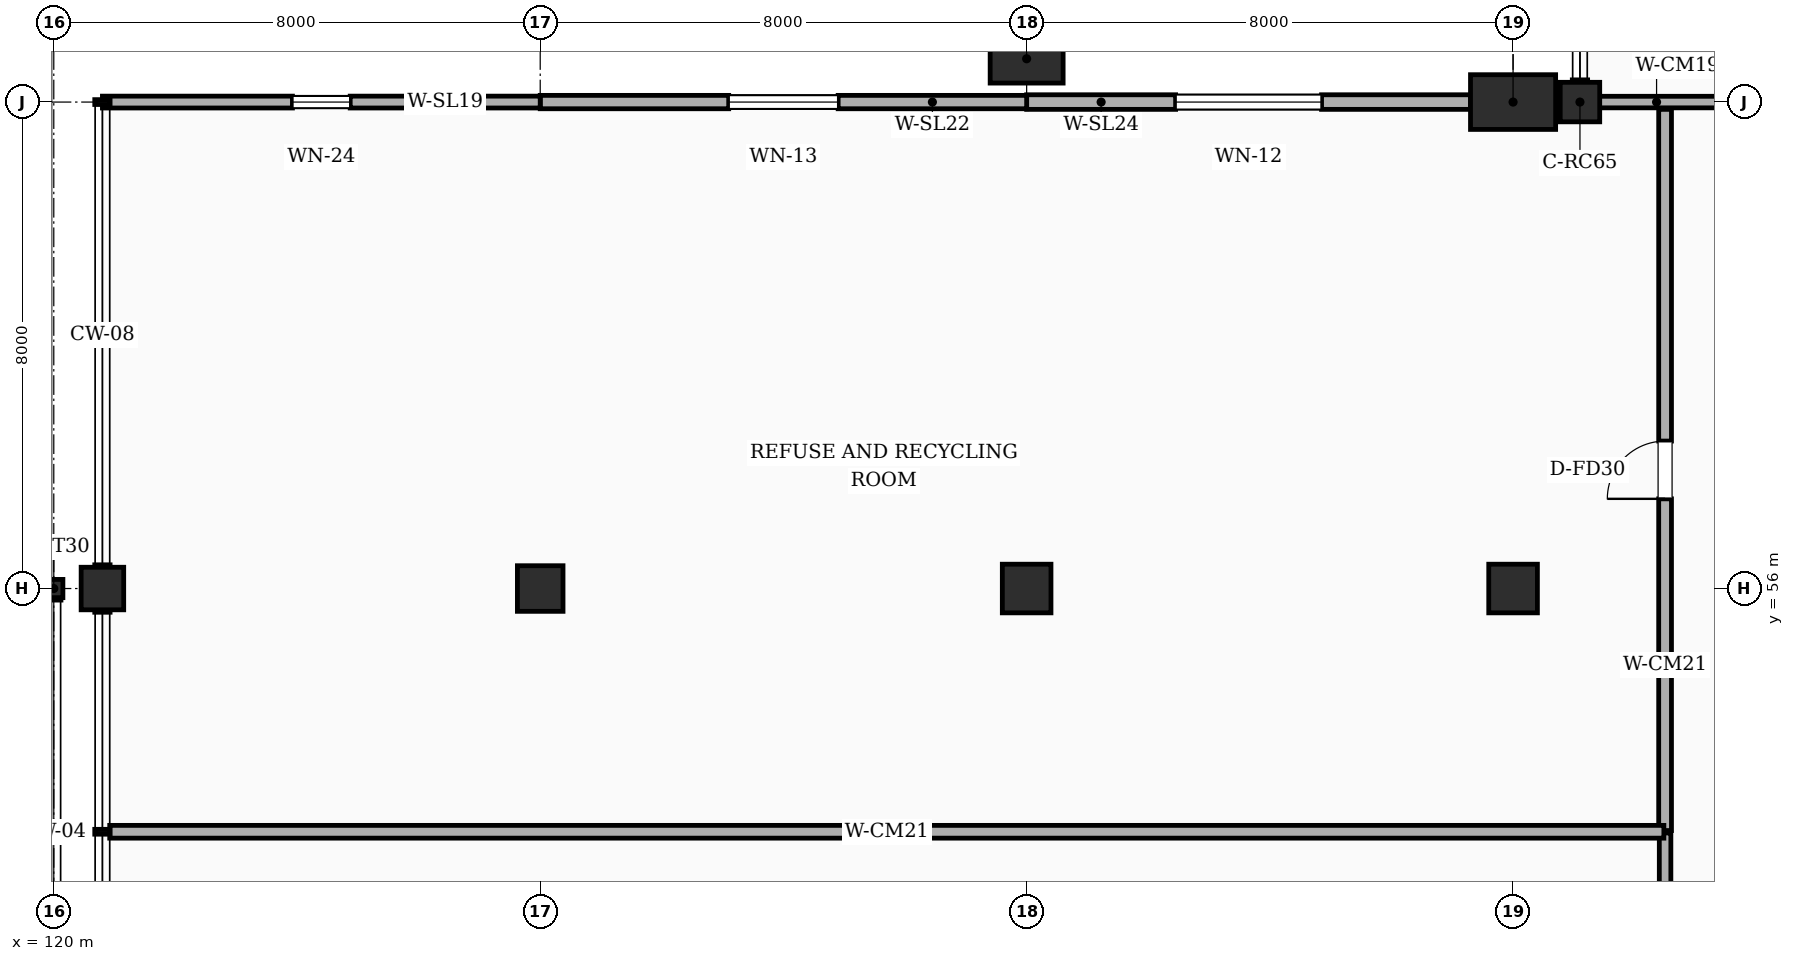
"""IFC4 building model, lengths in metres.
Left out: names, types, materials, properties, quantities, classifications, styles, units other than length and angle.
Written with IfcOpenShell. Run it as: python <this file> out.ifc"""

import sys

from ifc_helpers import new_model, si_unit, direction, frame, frame_2d, origin, origin_2d, place, context, subcontext, project, spatial, rectangle, i_section, extrude, element, fill, save


model = new_model("IFC4")
c1 = context("Model", 3, precision=1e-05, world=origin(), true_north=direction((0.0, 1.0)))
c2 = subcontext(c1, "Body", "Model", "MODEL_VIEW")
j1 = project(units=[si_unit("LENGTHUNIT", "METRE"), si_unit("PLANEANGLEUNIT", "RADIAN")], contexts=[c1])
p1 = place(None, origin())
s1 = spatial("IfcSite", under=j1, at=p1, CompositionType="ELEMENT")
p2 = place(p1, origin())
s2 = spatial("IfcBuilding", under=s1, at=p2, CompositionType="ELEMENT")
p3 = place(p2, origin())
s3 = spatial("IfcBuildingStorey", under=s2, at=p3, CompositionType="ELEMENT", Elevation=0.0)
p4 = place(p3, frame((136.0, 64.712, 0.0), z_axis=(0.0, 0.0, 1.0), x_axis=(1.0, 0.0, 0.0)))
e1 = element("IfcColumn", 1, at=p4, inside=s3, PredefinedType="COLUMN", context=c2, shape_type="SweptSolid", body=[
    extrude(rectangle(XDim=1.2, YDim=0.8, at=origin_2d()), origin(), (0.0, 0.0, 1.0), 5.4),
])
p5 = place(p3, frame((144.0, 64.0, 0.0), z_axis=(0.0, 0.0, 1.0), x_axis=(1.0, 0.0, 0.0)))
e2 = element("IfcColumn", 2, at=p5, inside=s3, PredefinedType="COLUMN", context=c2, shape_type="SweptSolid", body=[
    extrude(rectangle(XDim=1.4, YDim=0.9, at=origin_2d()), origin(), (0.0, 0.0, 1.0), 5.4),
])
p6 = place(p3, frame((120.0, 56.0, 0.0), z_axis=(0.0, 0.0, 1.0), x_axis=(1.0, 0.0, 0.0)))
e3 = element("IfcColumn", 3, at=p6, inside=s3, PredefinedType="COLUMN", context=c2, shape_type="SweptSolid", body=[
    extrude(i_section(OverallWidth=0.3, OverallDepth=0.3, WebThickness=0.011, FlangeThickness=0.019, FilletRadius=0.027, at=origin_2d()), origin(), (0.0, 0.0, 1.0), 5.4),
])
p7 = place(p3, frame((120.8, 56.0, 0.0), z_axis=(0.0, 0.0, 1.0), x_axis=(1.0, 0.0, 0.0)))
e4 = element("IfcColumn", 4, at=p7, inside=s3, PredefinedType="COLUMN", context=c2, shape_type="SweptSolid", body=[
    extrude(rectangle(XDim=0.7, YDim=0.7, at=origin_2d()), origin(), (0.0, 0.0, 1.0), 5.4),
])
p8 = place(p3, frame((128.0, 56.0, 0.0), z_axis=(0.0, 0.0, 1.0), x_axis=(1.0, 0.0, 0.0)))
e5 = element("IfcColumn", 5, at=p8, inside=s3, PredefinedType="COLUMN", context=c2, shape_type="SweptSolid", body=[
    extrude(rectangle(XDim=0.75, YDim=0.75, at=origin_2d()), origin(), (0.0, 0.0, 1.0), 5.4),
])
for number, where, z_axis, x_axis in (
    (6, (136.0, 56.0, 0.0), (0.0, 0.0, 1.0), (1.0, 0.0, 0.0)),
    (7, (144.0, 56.0, 0.0), (0.0, 0.0, 1.0), (1.0, 0.0, 0.0)),
):
    element("IfcColumn", number, at=place(p3, frame(where, z_axis=z_axis, x_axis=x_axis)), inside=s3, PredefinedType="COLUMN", context=c2, shape_type="SweptSolid", body=[
        extrude(rectangle(XDim=0.8, YDim=0.8, at=origin_2d()), origin(), (0.0, 0.0, 1.0), 5.4),
    ])
p9 = place(p3, frame((145.1, 64.0, 0.0), z_axis=(0.0, 0.0, 1.0), x_axis=(1.0, 0.0, 0.0)))
e8 = element("IfcColumn", 8, at=p9, inside=s3, PredefinedType="COLUMN", context=c2, shape_type="SweptSolid", body=[
    extrude(rectangle(XDim=0.65, YDim=0.65, at=origin_2d()), origin(), (0.0, 0.0, 1.0), 5.4),
])
p10 = place(p3, frame((143.3, 64.0, 0.0), z_axis=(0.0, 0.0, 1.0), x_axis=(-1.0, 0.0, 0.0)))
e9 = element("IfcWall", 9, at=p10, inside=s3, PredefinedType="SOLIDWALL", context=c2, shape_type="SweptSolid", body=[
    extrude(rectangle(XDim=7.3, YDim=0.24, at=frame_2d((3.65, 0.0))), origin(), (0.0, 0.0, 1.0), 5.1),
])
p11 = place(p10, frame((2.45, 0.0, 0.95)))
e10 = element("IfcOpeningElement", 10, at=p11, cuts=e9, PredefinedType="OPENING", context=c2, shape_type="SweptSolid", body=[
    extrude(rectangle(XDim=2.4, YDim=1.85, at=frame_2d((1.2, 0.925))), frame((0.0, 0.13, 0.0), z_axis=(0.0, -1.0, 0.0), x_axis=(1.0, 0.0, 0.0)), (0.0, 0.0, 1.0), 0.26),
])
p12 = place(p3, frame((136.0, 64.0, 0.0), z_axis=(0.0, 0.0, 1.0), x_axis=(-1.0, 0.0, 0.0)))
e11 = element("IfcWall", 11, at=p12, inside=s3, PredefinedType="SOLIDWALL", context=c2, shape_type="SweptSolid", body=[
    extrude(rectangle(XDim=8.0, YDim=0.22, at=frame_2d((4.0, 0.0))), origin(), (0.0, 0.0, 1.0), 5.1),
])
p13 = place(p12, frame((3.1, 0.0, 0.95)))
e12 = element("IfcOpeningElement", 12, at=p13, cuts=e11, PredefinedType="OPENING", context=c2, shape_type="SweptSolid", body=[
    extrude(rectangle(XDim=1.8, YDim=1.85, at=frame_2d((0.9, 0.925))), frame((0.0, 0.12, 0.0), z_axis=(0.0, -1.0, 0.0), x_axis=(1.0, 0.0, 0.0)), (0.0, 0.0, 1.0), 0.24),
])
p14 = place(p3, frame((128.0, 64.0, 0.0), z_axis=(0.0, 0.0, 1.0), x_axis=(-1.0, 0.0, 0.0)))
e13 = element("IfcWall", 13, at=p14, inside=s3, PredefinedType="SOLIDWALL", context=c2, shape_type="SweptSolid", body=[
    extrude(rectangle(XDim=7.2, YDim=0.195, at=frame_2d((3.6, 0.0))), origin(), (0.0, 0.0, 1.0), 5.1),
])
p15 = place(p14, frame((3.125, 0.0, 0.95)))
e14 = element("IfcOpeningElement", 14, at=p15, cuts=e13, PredefinedType="OPENING", context=c2, shape_type="SweptSolid", body=[
    extrude(rectangle(XDim=0.95, YDim=2.1, at=frame_2d((0.475, 1.05))), frame((0.0, 0.107, 0.0), z_axis=(0.0, -1.0, 0.0), x_axis=(1.0, 0.0, 0.0)), (0.0, 0.0, 1.0), 0.215),
])
p16 = place(p3, frame((146.5, 36.02, 0.0), z_axis=(0.0, 0.0, 1.0), x_axis=(0.0, 1.0, 0.0)))
e15 = element("IfcWall", 15, at=p16, inside=s3, PredefinedType="SOLIDWALL", context=c2, shape_type="SweptSolid", body=[
    extrude(rectangle(XDim=15.96, YDim=0.19, at=frame_2d((7.98, 0.0))), origin(), (0.0, 0.0, 1.0), 5.1),
])
p17 = place(p16, frame((7.38, 0.0, 0.0)))
e16 = element("IfcOpeningElement", 16, at=p17, cuts=e15, PredefinedType="OPENING", context=c2, shape_type="SweptSolid", body=[
    extrude(rectangle(XDim=1.2, YDim=2.15, at=frame_2d((0.6, 1.075))), frame((0.0, 0.105, 0.0), z_axis=(0.0, -1.0, 0.0), x_axis=(1.0, 0.0, 0.0)), (0.0, 0.0, 1.0), 0.21),
])
p18 = place(p3, frame((146.5, 52.02, 0.0), z_axis=(0.0, 0.0, 1.0), x_axis=(0.0, 1.0, 0.0)))
e17 = element("IfcWall", 17, at=p18, inside=s3, PredefinedType="SOLIDWALL", context=c2, shape_type="SweptSolid", body=[
    extrude(rectangle(XDim=11.86, YDim=0.21, at=frame_2d((5.93, 0.0))), origin(), (0.0, 0.0, 1.0), 4.27),
])
p19 = place(p18, frame((5.455, 0.0, 0.0)))
e18 = element("IfcOpeningElement", 18, at=p19, cuts=e17, PredefinedType="OPENING", context=c2, shape_type="SweptSolid", body=[
    extrude(rectangle(XDim=0.95, YDim=2.1, at=frame_2d((0.475, 1.05))), frame((0.0, 0.115, 0.0), z_axis=(0.0, -1.0, 0.0), x_axis=(1.0, 0.0, 0.0)), (0.0, 0.0, 1.0), 0.23),
])
p20 = place(p3, frame((120.92, 52.0, 0.0), z_axis=(0.0, 0.0, 1.0), x_axis=(1.0, 0.0, 0.0)))
e19 = element("IfcWall", 19, at=p20, inside=s3, PredefinedType="SOLIDWALL", context=c2, shape_type="SweptSolid", body=[
    extrude(rectangle(XDim=25.56, YDim=0.21, at=frame_2d((12.78, 0.0))), origin(), (0.0, 0.0, 1.0), 4.27),
])
p21 = place(p3, frame((145.22, 64.0, 0.0), z_axis=(0.0, 0.0, 1.0), x_axis=(1.0, 0.0, 0.0)))
e20 = element("IfcWall", 20, at=p21, inside=s3, PredefinedType="SOLIDWALL", context=c2, shape_type="SweptSolid", body=[
    extrude(rectangle(XDim=5.76, YDim=0.19, at=frame_2d((2.88, 0.0))), origin(), (0.0, 0.0, 1.0), 4.27),
])
p22 = place(p21, frame((2.28, 0.0, 0.0)))
e21 = element("IfcOpeningElement", 21, at=p22, cuts=e20, PredefinedType="OPENING", context=c2, shape_type="SweptSolid", body=[
    extrude(rectangle(XDim=1.2, YDim=2.15, at=frame_2d((0.6, 1.075))), frame((0.0, 0.105, 0.0), z_axis=(0.0, -1.0, 0.0), x_axis=(1.0, 0.0, 0.0)), (0.0, 0.0, 1.0), 0.21),
])
p23 = place(p11, origin())
e22 = element("IfcWindow", 22, at=p23, inside=s3, PartitioningType="SINGLE_PANEL", PredefinedType="WINDOW", context=c2, shape_type="SweptSolid", body=[
    extrude(rectangle(XDim=2.4, YDim=1.85, at=frame_2d((1.2, 0.925))), frame((0.0, 0.03, 0.0), z_axis=(0.0, -1.0, 0.0), x_axis=(1.0, 0.0, 0.0)), (0.0, 0.0, 1.0), 0.06),
])
fill(e10, e22)
p24 = place(p13, origin())
e23 = element("IfcWindow", 23, at=p24, inside=s3, PartitioningType="SINGLE_PANEL", PredefinedType="WINDOW", context=c2, shape_type="SweptSolid", body=[
    extrude(rectangle(XDim=1.8, YDim=1.85, at=frame_2d((0.9, 0.925))), frame((0.0, 0.03, 0.0), z_axis=(0.0, -1.0, 0.0), x_axis=(1.0, 0.0, 0.0)), (0.0, 0.0, 1.0), 0.06),
])
fill(e12, e23)
p25 = place(p15, origin())
e24 = element("IfcWindow", 24, at=p25, inside=s3, PartitioningType="SINGLE_PANEL", PredefinedType="WINDOW", context=c2, shape_type="SweptSolid", body=[
    extrude(rectangle(XDim=0.95, YDim=2.1, at=frame_2d((0.475, 1.05))), frame((0.0, 0.03, 0.0), z_axis=(0.0, -1.0, 0.0), x_axis=(1.0, 0.0, 0.0)), (0.0, 0.0, 1.0), 0.06),
])
fill(e14, e24)
p26 = place(p19, origin())
e25 = element("IfcDoor", 25, at=p26, inside=s3, OperationType="SINGLE_SWING_LEFT", PredefinedType="DOOR", context=c2, shape_type="SweptSolid", body=[
    extrude(rectangle(XDim=0.95, YDim=2.1, at=frame_2d((0.475, 1.05))), frame((0.0, 0.025, 0.0), z_axis=(0.0, -1.0, 0.0), x_axis=(1.0, 0.0, 0.0)), (0.0, 0.0, 1.0), 0.05),
])
fill(e18, e25)
save(model, sys.argv[1])
